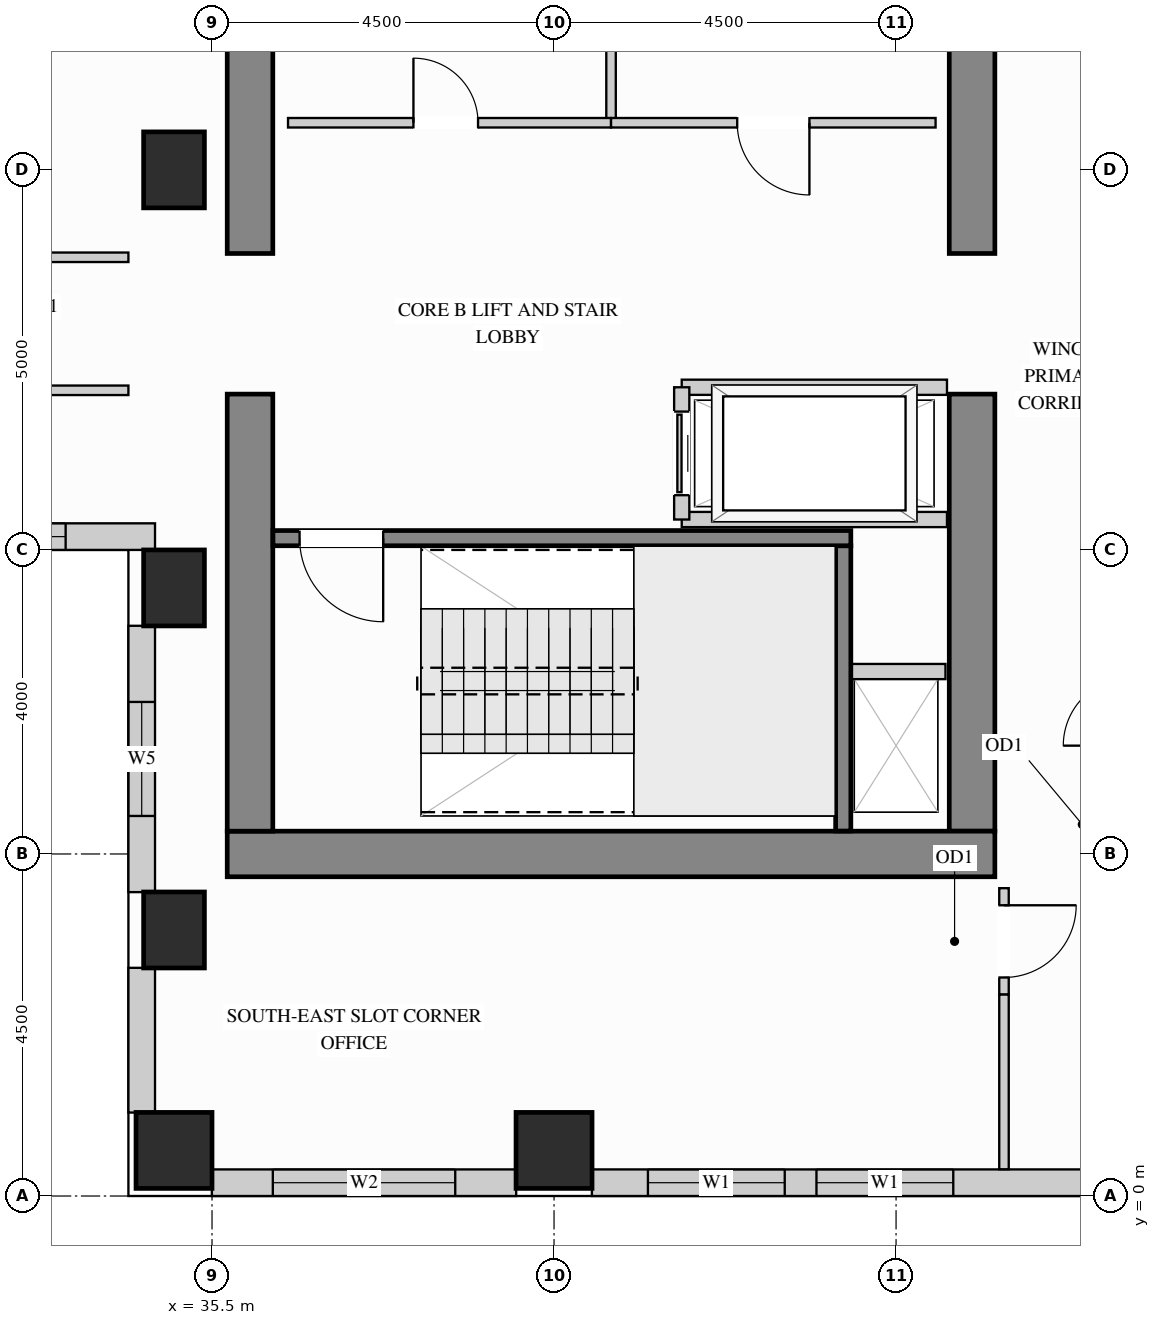
"""IFC4 building model, lengths in metres.
Left out: names, types, materials, properties, quantities, classifications, styles, units other than length and angle.
Written with IfcOpenShell. Run it as: python <this file> out.ifc"""

import sys

from ifc_helpers import new_model, si_unit, direction, frame, frame_2d, origin, origin_2d, place, context, subcontext, project, spatial, rectangle, extrude, source, transform, mapped, element, fill, save


model = new_model("IFC4")
c1 = context("Model", 3, precision=1e-05, world=origin(), true_north=direction((0.0, 1.0)))
c2 = subcontext(c1, "Body", "Model", "MODEL_VIEW")
j1 = project(units=[si_unit("LENGTHUNIT", "METRE"), si_unit("PLANEANGLEUNIT", "RADIAN")], contexts=[c1])
p1 = place(None, origin())
s1 = spatial("IfcSite", under=j1, at=p1, CompositionType="ELEMENT")
p2 = place(p1, origin())
s2 = spatial("IfcBuilding", under=s1, at=p2, CompositionType="ELEMENT")
p3 = place(p2, frame((0.0, 0.0, 171.9)))
s3 = spatial("IfcBuildingStorey", under=s2, at=p3, CompositionType="ELEMENT", Elevation=171.9)
m1 = source(origin(), c2, "Body", "SweptSolid", [
    extrude(rectangle(XDim=0.8, YDim=1.0, at=origin_2d()), origin(), (0.0, 0.0, 1.0), 3.4),
])
for number, where, z_axis, x_axis in (
    (1, (35.0, 13.5, 0.0), (0.0, 0.0, 1.0), (1.0, 0.0, 0.0)),
    (2, (35.0, 3.5, 0.0), (0.0, 0.0, 1.0), (1.0, 0.0, 0.0)),
    (3, (35.0, 8.0, 0.0), (0.0, 0.0, 1.0), (1.0, 0.0, 0.0)),
):
    element("IfcColumn", number, at=place(p3, frame(where, z_axis=z_axis, x_axis=x_axis)), inside=s3, PredefinedType="COLUMN", context=c2, shape_type="MappedRepresentation", body=[
        mapped(m1, transform((0.0, 0.0, 0.0), x_axis=(1.0, 0.0, 0.0), y_axis=(0.0, 1.0, 0.0), z_axis=(0.0, 0.0, 1.0))),
    ])
m2 = source(origin(), c2, "Body", "SweptSolid", [
    extrude(rectangle(XDim=1.0, YDim=1.0, at=origin_2d()), origin(), (0.0, 0.0, 1.0), 3.4),
])
for number, where, z_axis, x_axis in (
    (4, (35.0, 0.6, 0.0), (0.0, 0.0, 1.0), (1.0, 0.0, 0.0)),
    (5, (40.0, 0.6, 0.0), (0.0, 0.0, 1.0), (1.0, 0.0, 0.0)),
):
    element("IfcColumn", number, at=place(p3, frame(where, z_axis=z_axis, x_axis=x_axis)), inside=s3, PredefinedType="COLUMN", context=c2, shape_type="MappedRepresentation", body=[
        mapped(m2, transform((0.0, 0.0, 0.0), x_axis=(1.0, 0.0, 0.0), y_axis=(0.0, 1.0, 0.0), z_axis=(0.0, 0.0, 1.0))),
    ])
m3 = source(origin(), c2, "Body", "SweptSolid", [
    extrude(rectangle(XDim=5.75, YDim=0.6, at=frame_2d((2.875, 0.0))), origin(), (0.0, 0.0, 1.0), 3.4),
])
p4 = place(p3, frame((45.5, 4.8, 0.0), z_axis=(0.0, 0.0, 1.0), x_axis=(0.0, 1.0, 0.0)))
e6 = element("IfcWall", 6, at=p4, inside=s3, PredefinedType="SHEAR", context=c2, shape_type="MappedRepresentation", body=[
    mapped(m3, transform((0.0, 0.0, 0.0), x_axis=(1.0, 0.0, 0.0), y_axis=(0.0, 1.0, 0.0), z_axis=(0.0, 0.0, 1.0))),
])
m4 = source(origin(), c2, "Body", "SweptSolid", [
    extrude(rectangle(XDim=3.8, YDim=0.6, at=frame_2d((1.9, 0.0))), origin(), (0.0, 0.0, 1.0), 3.4),
])
p5 = place(p3, frame((45.5, 12.4, 0.0), z_axis=(0.0, 0.0, 1.0), x_axis=(0.0, 1.0, 0.0)))
e7 = element("IfcWall", 7, at=p5, inside=s3, PredefinedType="SHEAR", context=c2, shape_type="MappedRepresentation", body=[
    mapped(m4, transform((0.0, 0.0, 0.0), x_axis=(1.0, 0.0, 0.0), y_axis=(0.0, 1.0, 0.0), z_axis=(0.0, 0.0, 1.0))),
])
m5 = source(origin(), c2, "Body", "SweptSolid", [
    extrude(rectangle(XDim=10.1, YDim=0.6, at=frame_2d((5.05, 0.0))), origin(), (0.0, 0.0, 1.0), 3.4),
])
p6 = place(p3, frame((35.7, 4.5, 0.0), z_axis=(0.0, 0.0, 1.0), x_axis=(1.0, 0.0, 0.0)))
e8 = element("IfcWall", 8, at=p6, inside=s3, PredefinedType="SHEAR", context=c2, shape_type="MappedRepresentation", body=[
    mapped(m5, transform((0.0, 0.0, 0.0), x_axis=(1.0, 0.0, 0.0), y_axis=(0.0, 1.0, 0.0), z_axis=(0.0, 0.0, 1.0))),
])
p7 = place(p3, frame((36.0, 4.8, 0.0), z_axis=(0.0, 0.0, 1.0), x_axis=(0.0, 1.0, 0.0)))
e9 = element("IfcWall", 9, at=p7, inside=s3, PredefinedType="SHEAR", context=c2, shape_type="MappedRepresentation", body=[
    mapped(m3, transform((0.0, 0.0, 0.0), x_axis=(1.0, 0.0, 0.0), y_axis=(0.0, 1.0, 0.0), z_axis=(0.0, 0.0, 1.0))),
])
p8 = place(p3, frame((36.0, 12.4, 0.0), z_axis=(0.0, 0.0, 1.0), x_axis=(0.0, 1.0, 0.0)))
e10 = element("IfcWall", 10, at=p8, inside=s3, PredefinedType="SHEAR", context=c2, shape_type="MappedRepresentation", body=[
    mapped(m4, transform((0.0, 0.0, 0.0), x_axis=(1.0, 0.0, 0.0), y_axis=(0.0, 1.0, 0.0), z_axis=(0.0, 0.0, 1.0))),
])
p9 = place(p3, frame((30.898, 8.675, 0.0), z_axis=(0.0, 0.0, 1.0), x_axis=(1.0, 0.0, 0.0)))
e11 = element("IfcWall", 11, at=p9, inside=s3, PredefinedType="SOLIDWALL", context=c2, shape_type="SweptSolid", body=[
    extrude(rectangle(XDim=3.852, YDim=0.35, at=frame_2d((1.926, 0.0))), origin(), (0.0, 0.0, 1.0), 3.385),
])
p10 = place(p9, frame((1.176, 0.0, 0.78)))
e12 = element("IfcOpeningElement", 12, at=p10, cuts=e11, PredefinedType="OPENING", context=c2, shape_type="SweptSolid", body=[
    extrude(rectangle(XDim=1.5, YDim=2.0, at=frame_2d((0.75, 1.0))), frame((0.0, 0.185, 0.0), z_axis=(0.0, -1.0, 0.0), x_axis=(1.0, 0.0, 0.0)), (0.0, 0.0, 1.0), 0.37),
])
p11 = place(p3, frame((34.575, 7.502, 0.0), z_axis=(0.0, 0.0, 1.0), x_axis=(0.0, -1.0, 0.0)))
e13 = element("IfcWall", 13, at=p11, inside=s3, PredefinedType="SOLIDWALL", context=c2, shape_type="SweptSolid", body=[
    extrude(rectangle(XDim=3.504, YDim=0.35, at=frame_2d((1.752, 0.0))), origin(), (0.0, 0.0, 1.0), 2.612),
])
p12 = place(p11, frame((1.002, 0.0, 0.78)))
e14 = element("IfcOpeningElement", 14, at=p12, cuts=e13, PredefinedType="OPENING", context=c2, shape_type="SweptSolid", body=[
    extrude(rectangle(XDim=1.5, YDim=1.652, at=frame_2d((0.75, 0.826))), frame((0.0, 0.185, 0.0), z_axis=(0.0, -1.0, 0.0), x_axis=(1.0, 0.0, 0.0)), (0.0, 0.0, 1.0), 0.37),
])
m6 = source(origin(), c2, "Body", "SweptSolid", [
    extrude(rectangle(XDim=1.904, YDim=0.35, at=frame_2d((0.952, 0.0))), origin(), (0.0, 0.0, 1.0), 2.612),
])
p13 = place(p3, frame((34.575, 3.002, 0.0), z_axis=(0.0, 0.0, 1.0), x_axis=(0.0, -1.0, 0.0)))
e15 = element("IfcWall", 15, at=p13, inside=s3, PredefinedType="SOLIDWALL", context=c2, shape_type="MappedRepresentation", body=[
    mapped(m6, transform((0.0, 0.0, 0.0), x_axis=(1.0, 0.0, 0.0), y_axis=(0.0, 1.0, 0.0), z_axis=(0.0, 0.0, 1.0))),
])
p14 = place(p3, frame((35.498, 0.175, 0.0), z_axis=(0.0, 0.0, 1.0), x_axis=(1.0, 0.0, 0.0)))
e16 = element("IfcWall", 16, at=p14, inside=s3, PredefinedType="SOLIDWALL", context=c2, shape_type="SweptSolid", body=[
    extrude(rectangle(XDim=4.004, YDim=0.35, at=frame_2d((2.002, 0.0))), origin(), (0.0, 0.0, 1.0), 2.612),
])
p15 = place(p14, frame((0.802, 0.0, 0.78)))
e17 = element("IfcOpeningElement", 17, at=p15, cuts=e16, PredefinedType="OPENING", context=c2, shape_type="SweptSolid", body=[
    extrude(rectangle(XDim=2.4, YDim=1.652, at=frame_2d((1.2, 0.826))), frame((0.0, 0.185, 0.0), z_axis=(0.0, -1.0, 0.0), x_axis=(1.0, 0.0, 0.0)), (0.0, 0.0, 1.0), 0.37),
])
p16 = place(p3, frame((40.498, 0.175, 0.0), z_axis=(0.0, 0.0, 1.0), x_axis=(1.0, 0.0, 0.0)))
e18 = element("IfcWall", 18, at=p16, inside=s3, PredefinedType="SOLIDWALL", context=c2, shape_type="SweptSolid", body=[
    extrude(rectangle(XDim=6.604, YDim=0.35, at=frame_2d((3.302, 0.0))), origin(), (0.0, 0.0, 1.0), 2.612),
])
p17 = place(p16, frame((0.737, 0.0, 0.78)))
e19 = element("IfcOpeningElement", 19, at=p17, cuts=e18, PredefinedType="OPENING", context=c2, shape_type="SweptSolid", body=[
    extrude(rectangle(XDim=1.8, YDim=1.652, at=frame_2d((0.9, 0.826))), frame((0.0, 0.185, 0.0), z_axis=(0.0, -1.0, 0.0), x_axis=(1.0, 0.0, 0.0)), (0.0, 0.0, 1.0), 0.37),
])
p18 = place(p16, frame((2.955, 0.0, 0.78)))
e20 = element("IfcOpeningElement", 20, at=p18, cuts=e18, PredefinedType="OPENING", context=c2, shape_type="SweptSolid", body=[
    extrude(rectangle(XDim=1.8, YDim=1.652, at=frame_2d((0.9, 0.826))), frame((0.0, 0.185, 0.0), z_axis=(0.0, -1.0, 0.0), x_axis=(1.0, 0.0, 0.0)), (0.0, 0.0, 1.0), 0.37),
])
m7 = source(origin(), c2, "Body", "SweptSolid", [
    extrude(rectangle(XDim=1.93, YDim=0.125, at=frame_2d((0.965, 0.0))), origin(), (0.0, 0.0, 1.0), 3.385),
])
p19 = place(p3, frame((40.75, 14.12, 0.0), z_axis=(0.0, 0.0, 1.0), x_axis=(0.0, 1.0, 0.0)))
e21 = element("IfcWall", 21, at=p19, inside=s3, PredefinedType="PARTITIONING", context=c2, shape_type="MappedRepresentation", body=[
    mapped(m7, transform((0.0, 0.0, 0.0), x_axis=(1.0, 0.0, 0.0), y_axis=(0.0, 1.0, 0.0), z_axis=(0.0, 0.0, 1.0))),
])
p20 = place(p3, frame((36.5, 14.12, 0.0), z_axis=(0.0, 0.0, 1.0), x_axis=(1.0, 0.0, 0.0)))
e22 = element("IfcWall", 22, at=p20, inside=s3, PredefinedType="PARTITIONING", context=c2, shape_type="SweptSolid", body=[
    extrude(rectangle(XDim=4.25, YDim=0.125, at=frame_2d((2.125, 0.0))), origin(), (0.0, 0.0, 1.0), 3.385),
])
p21 = place(p20, frame((1.65, 0.0, 0.0)))
e23 = element("IfcOpeningElement", 23, at=p21, cuts=e22, PredefinedType="OPENING", context=c2, shape_type="SweptSolid", body=[
    extrude(rectangle(XDim=0.85, YDim=2.1, at=frame_2d((0.425, 1.05))), frame((0.0, 0.073, 0.0), z_axis=(0.0, -1.0, 0.0), x_axis=(1.0, 0.0, 0.0)), (0.0, 0.0, 1.0), 0.145),
])
p22 = place(p3, frame((40.75, 14.12, 0.0), z_axis=(0.0, 0.0, 1.0), x_axis=(1.0, 0.0, 0.0)))
e24 = element("IfcWall", 24, at=p22, inside=s3, PredefinedType="PARTITIONING", context=c2, shape_type="SweptSolid", body=[
    extrude(rectangle(XDim=4.27, YDim=0.125, at=frame_2d((2.135, 0.0))), origin(), (0.0, 0.0, 1.0), 3.385),
])
p23 = place(p22, frame((1.66, 0.0, 0.0)))
e25 = element("IfcOpeningElement", 25, at=p23, cuts=e24, PredefinedType="OPENING", context=c2, shape_type="SweptSolid", body=[
    extrude(rectangle(XDim=0.95, YDim=2.15, at=frame_2d((0.475, 1.075))), frame((0.0, 0.073, 0.0), z_axis=(0.0, -1.0, 0.0), x_axis=(1.0, 0.0, 0.0)), (0.0, 0.0, 1.0), 0.145),
])
p24 = place(p3, frame((45.92, 2.65, 0.0), z_axis=(0.0, 0.0, 1.0), x_axis=(0.0, 1.0, 0.0)))
e26 = element("IfcWall", 26, at=p24, inside=s3, PredefinedType="PARTITIONING", context=c2, shape_type="SweptSolid", body=[
    extrude(rectangle(XDim=1.4, YDim=0.125, at=frame_2d((0.7, 0.0))), origin(), (0.0, 0.0, 1.0), 3.385),
])
p25 = place(p24, frame((0.225, 0.0, 0.0)))
e27 = element("IfcOpeningElement", 27, at=p25, cuts=e26, PredefinedType="OPENING", context=c2, shape_type="SweptSolid", body=[
    extrude(rectangle(XDim=0.95, YDim=2.15, at=frame_2d((0.475, 1.075))), frame((0.0, 0.073, 0.0), z_axis=(0.0, -1.0, 0.0), x_axis=(1.0, 0.0, 0.0)), (0.0, 0.0, 1.0), 0.145),
])
m8 = source(origin(), c2, "Body", "SweptSolid", [
    extrude(rectangle(XDim=2.298, YDim=0.125, at=frame_2d((1.149, 0.0))), origin(), (0.0, 0.0, 1.0), 3.385),
])
p26 = place(p3, frame((45.92, 0.352, 0.0), z_axis=(0.0, 0.0, 1.0), x_axis=(0.0, 1.0, 0.0)))
e28 = element("IfcWall", 28, at=p26, inside=s3, PredefinedType="PARTITIONING", context=c2, shape_type="MappedRepresentation", body=[
    mapped(m8, transform((0.0, 0.0, 0.0), x_axis=(1.0, 0.0, 0.0), y_axis=(0.0, 1.0, 0.0), z_axis=(0.0, 0.0, 1.0))),
])
p27 = place(p3, frame((29.85, 12.35, 0.0), z_axis=(0.0, 0.0, 1.0), x_axis=(1.0, 0.0, 0.0)))
e29 = element("IfcWall", 29, at=p27, inside=s3, PredefinedType="PARTITIONING", context=c2, shape_type="SweptSolid", body=[
    extrude(rectangle(XDim=4.55, YDim=0.125, at=frame_2d((2.275, 0.0))), origin(), (0.0, 0.0, 1.0), 3.385),
])
p28 = place(p27, frame((1.8, 0.0, 0.0)))
e30 = element("IfcOpeningElement", 30, at=p28, cuts=e29, PredefinedType="OPENING", context=c2, shape_type="SweptSolid", body=[
    extrude(rectangle(XDim=0.95, YDim=2.15, at=frame_2d((0.475, 1.075))), frame((0.0, 0.073, 0.0), z_axis=(0.0, -1.0, 0.0), x_axis=(1.0, 0.0, 0.0)), (0.0, 0.0, 1.0), 0.145),
])
p29 = place(p3, frame((26.95, 10.6, 0.0), z_axis=(0.0, 0.0, 1.0), x_axis=(1.0, 0.0, 0.0)))
e31 = element("IfcWall", 31, at=p29, inside=s3, PredefinedType="PARTITIONING", context=c2, shape_type="SweptSolid", body=[
    extrude(rectangle(XDim=7.45, YDim=0.125, at=frame_2d((3.725, 0.0))), origin(), (0.0, 0.0, 1.0), 3.385),
])
p30 = place(p29, frame((4.478, 0.0, 0.0)))
e32 = element("IfcOpeningElement", 32, at=p30, cuts=e31, PredefinedType="OPENING", context=c2, shape_type="SweptSolid", body=[
    extrude(rectangle(XDim=0.95, YDim=2.15, at=frame_2d((0.475, 1.075))), frame((0.0, 0.073, 0.0), z_axis=(0.0, -1.0, 0.0), x_axis=(1.0, 0.0, 0.0)), (0.0, 0.0, 1.0), 0.145),
])
m9 = source(origin(), c2, "Body", "SweptSolid", [
    extrude(rectangle(XDim=1.3, YDim=0.2, at=frame_2d((0.65, 0.0))), origin(), (0.0, 0.0, 1.0), 3.385),
])
p31 = place(p3, frame((43.85, 6.9, 0.0), z_axis=(0.0, 0.0, 1.0), x_axis=(1.0, 0.0, 0.0)))
e33 = element("IfcWall", 33, at=p31, inside=s3, PredefinedType="PARTITIONING", context=c2, shape_type="MappedRepresentation", body=[
    mapped(m9, transform((0.0, 0.0, 0.0), x_axis=(1.0, 0.0, 0.0), y_axis=(0.0, 1.0, 0.0), z_axis=(0.0, 0.0, 1.0))),
])
m10 = source(origin(), c2, "Body", "SweptSolid", [
    extrude(rectangle(XDim=3.49, YDim=0.2, at=frame_2d((1.745, 0.0))), origin(), (0.0, 0.0, 1.0), 3.385),
])
for number, where, z_axis, x_axis in (
    (34, (41.68, 10.64, 0.0), (0.0, 0.0, 1.0), (1.0, 0.0, 0.0)),
    (35, (41.68, 8.9, 0.0), (0.0, 0.0, 1.0), (1.0, 0.0, 0.0)),
):
    element("IfcWall", number, at=place(p3, frame(where, z_axis=z_axis, x_axis=x_axis)), inside=s3, PredefinedType="PARTITIONING", context=c2, shape_type="MappedRepresentation", body=[
        mapped(m10, transform((0.0, 0.0, 0.0), x_axis=(1.0, 0.0, 0.0), y_axis=(0.0, 1.0, 0.0), z_axis=(0.0, 0.0, 1.0))),
    ])
p32 = place(p3, frame((41.68, 8.9, 0.0), z_axis=(0.0, 0.0, 1.0), x_axis=(0.0, 1.0, 0.0)))
e36 = element("IfcWall", 36, at=p32, inside=s3, PredefinedType="PARTITIONING", context=c2, shape_type="SweptSolid", body=[
    extrude(rectangle(XDim=1.74, YDim=0.2, at=frame_2d((0.87, 0.0))), origin(), (0.0, 0.0, 1.0), 3.385),
])
p33 = place(p32, frame((0.32, 0.0, 0.0)))
e37 = element("IfcOpeningElement", 37, at=p33, cuts=e36, PredefinedType="OPENING", context=c2, shape_type="SweptSolid", body=[
    extrude(rectangle(XDim=1.1, YDim=2.2, at=frame_2d((0.55, 1.1))), frame((0.0, 0.11, 0.0), z_axis=(0.0, -1.0, 0.0), x_axis=(1.0, 0.0, 0.0)), (0.0, 0.0, 1.0), 0.22),
])
m11 = source(origin(), c2, "Body", "SweptSolid", [
    extrude(rectangle(XDim=3.753, YDim=0.2, at=frame_2d((1.876, 0.0))), origin(), (0.0, 0.0, 1.0), 3.4),
])
p34 = place(p3, frame((43.805, 4.802, 0.0), z_axis=(0.0, 0.0, 1.0), x_axis=(0.0, 1.0, 0.0)))
e38 = element("IfcWall", 38, at=p34, inside=s3, PredefinedType="SHEAR", context=c2, shape_type="MappedRepresentation", body=[
    mapped(m11, transform((0.0, 0.0, 0.0), x_axis=(1.0, 0.0, 0.0), y_axis=(0.0, 1.0, 0.0), z_axis=(0.0, 0.0, 1.0))),
])
p35 = place(p3, frame((36.302, 8.655, 0.0), z_axis=(0.0, 0.0, 1.0), x_axis=(1.0, 0.0, 0.0)))
e39 = element("IfcWall", 39, at=p35, inside=s3, PredefinedType="SHEAR", context=c2, shape_type="SweptSolid", body=[
    extrude(rectangle(XDim=7.603, YDim=0.2, at=frame_2d((3.802, 0.0))), origin(), (0.0, 0.0, 1.0), 3.4),
])
p36 = place(p35, frame((0.35, 0.0, 0.0)))
e40 = element("IfcOpeningElement", 40, at=p36, cuts=e39, PredefinedType="OPENING", context=c2, shape_type="SweptSolid", body=[
    extrude(rectangle(XDim=1.1, YDim=2.15, at=frame_2d((0.55, 1.075))), frame((0.0, 0.11, 0.0), z_axis=(0.0, -1.0, 0.0), x_axis=(1.0, 0.0, 0.0)), (0.0, 0.0, 1.0), 0.22),
])
m12 = source(origin(), c2, "Body", "SweptSolid", [
    extrude(rectangle(XDim=1.1, YDim=2.2, at=frame_2d((0.55, 1.1))), frame((0.0, 0.025, 0.0), z_axis=(0.0, -1.0, 0.0), x_axis=(1.0, 0.0, 0.0)), (0.0, 0.0, 1.0), 0.05),
])
p37 = place(p33, origin())
e41 = element("IfcDoor", 41, at=p37, inside=s3, OperationType="SLIDING_TO_LEFT", PredefinedType="DOOR", context=c2, shape_type="MappedRepresentation", body=[
    mapped(m12, transform((0.0, 0.0, 0.0), x_axis=(1.0, 0.0, 0.0), y_axis=(0.0, 1.0, 0.0), z_axis=(0.0, 0.0, 1.0))),
])
fill(e37, e41)
m13 = source(origin(), c2, "Body", "SweptSolid", [
    extrude(rectangle(XDim=0.95, YDim=2.15, at=frame_2d((0.475, 1.075))), frame((0.0, 0.025, 0.0), z_axis=(0.0, -1.0, 0.0), x_axis=(1.0, 0.0, 0.0)), (0.0, 0.0, 1.0), 0.05),
])
p38 = place(p23, origin())
e42 = element("IfcDoor", 42, at=p38, inside=s3, OperationType="SINGLE_SWING_RIGHT", PredefinedType="DOOR", context=c2, shape_type="MappedRepresentation", body=[
    mapped(m13, transform((0.0, 0.0, 0.0), x_axis=(1.0, 0.0, 0.0), y_axis=(0.0, 1.0, 0.0), z_axis=(0.0, 0.0, 1.0))),
])
fill(e25, e42)
p39 = place(p25, origin())
e43 = element("IfcDoor", 43, at=p39, inside=s3, OperationType="SINGLE_SWING_RIGHT", PredefinedType="DOOR", context=c2, shape_type="MappedRepresentation", body=[
    mapped(m13, transform((0.0, 0.0, 0.0), x_axis=(1.0, 0.0, 0.0), y_axis=(0.0, 1.0, 0.0), z_axis=(0.0, 0.0, 1.0))),
])
fill(e27, e43)
m14 = source(origin(), c2, "Body", "SweptSolid", [
    extrude(rectangle(XDim=0.85, YDim=2.1, at=frame_2d((0.425, 1.05))), frame((0.0, 0.025, 0.0), z_axis=(0.0, -1.0, 0.0), x_axis=(1.0, 0.0, 0.0)), (0.0, 0.0, 1.0), 0.05),
])
p40 = place(p21, origin())
e44 = element("IfcDoor", 44, at=p40, inside=s3, OperationType="SINGLE_SWING_LEFT", PredefinedType="DOOR", context=c2, shape_type="MappedRepresentation", body=[
    mapped(m14, transform((0.0, 0.0, 0.0), x_axis=(1.0, 0.0, 0.0), y_axis=(0.0, 1.0, 0.0), z_axis=(0.0, 0.0, 1.0))),
])
fill(e23, e44)
m15 = source(origin(), c2, "Body", "SweptSolid", [
    extrude(rectangle(XDim=1.1, YDim=2.15, at=frame_2d((0.55, 1.075))), frame((0.0, 0.025, 0.0), z_axis=(0.0, -1.0, 0.0), x_axis=(1.0, 0.0, 0.0)), (0.0, 0.0, 1.0), 0.05),
])
p41 = place(p36, origin())
e45 = element("IfcDoor", 45, at=p41, inside=s3, OperationType="SINGLE_SWING_RIGHT", PredefinedType="DOOR", context=c2, shape_type="MappedRepresentation", body=[
    mapped(m15, transform((0.0, 0.0, 0.0), x_axis=(1.0, 0.0, 0.0), y_axis=(0.0, 1.0, 0.0), z_axis=(0.0, 0.0, 1.0))),
])
fill(e40, e45)
m16 = source(origin(), c2, "Body", "SweptSolid", [
    extrude(rectangle(XDim=1.8, YDim=1.652, at=frame_2d((0.9, 0.826))), frame((0.0, 0.03, 0.0), z_axis=(0.0, -1.0, 0.0), x_axis=(1.0, 0.0, 0.0)), (0.0, 0.0, 1.0), 0.06),
])
p42 = place(p17, origin())
e46 = element("IfcWindow", 46, at=p42, inside=s3, PartitioningType="SINGLE_PANEL", PredefinedType="WINDOW", context=c2, shape_type="MappedRepresentation", body=[
    mapped(m16, transform((0.0, 0.0, 0.0), x_axis=(1.0, 0.0, 0.0), y_axis=(0.0, 1.0, 0.0), z_axis=(0.0, 0.0, 1.0))),
])
fill(e19, e46)
p43 = place(p18, origin())
e47 = element("IfcWindow", 47, at=p43, inside=s3, PartitioningType="SINGLE_PANEL", PredefinedType="WINDOW", context=c2, shape_type="MappedRepresentation", body=[
    mapped(m16, transform((0.0, 0.0, 0.0), x_axis=(1.0, 0.0, 0.0), y_axis=(0.0, 1.0, 0.0), z_axis=(0.0, 0.0, 1.0))),
])
fill(e20, e47)
m17 = source(origin(), c2, "Body", "SweptSolid", [
    extrude(rectangle(XDim=2.4, YDim=1.652, at=frame_2d((1.2, 0.826))), frame((0.0, 0.03, 0.0), z_axis=(0.0, -1.0, 0.0), x_axis=(1.0, 0.0, 0.0)), (0.0, 0.0, 1.0), 0.06),
])
p44 = place(p15, origin())
e48 = element("IfcWindow", 48, at=p44, inside=s3, PartitioningType="SINGLE_PANEL", PredefinedType="WINDOW", context=c2, shape_type="MappedRepresentation", body=[
    mapped(m17, transform((0.0, 0.0, 0.0), x_axis=(1.0, 0.0, 0.0), y_axis=(0.0, 1.0, 0.0), z_axis=(0.0, 0.0, 1.0))),
])
fill(e17, e48)
m18 = source(origin(), c2, "Body", "SweptSolid", [
    extrude(rectangle(XDim=1.5, YDim=2.0, at=frame_2d((0.75, 1.0))), frame((0.0, 0.03, 0.0), z_axis=(0.0, -1.0, 0.0), x_axis=(1.0, 0.0, 0.0)), (0.0, 0.0, 1.0), 0.06),
])
p45 = place(p10, origin())
e49 = element("IfcWindow", 49, at=p45, inside=s3, PartitioningType="SINGLE_PANEL", PredefinedType="WINDOW", context=c2, shape_type="MappedRepresentation", body=[
    mapped(m18, transform((0.0, 0.0, 0.0), x_axis=(1.0, 0.0, 0.0), y_axis=(0.0, 1.0, 0.0), z_axis=(0.0, 0.0, 1.0))),
])
fill(e12, e49)
m19 = source(origin(), c2, "Body", "SweptSolid", [
    extrude(rectangle(XDim=1.5, YDim=1.652, at=frame_2d((0.75, 0.826))), frame((0.0, 0.03, 0.0), z_axis=(0.0, -1.0, 0.0), x_axis=(1.0, 0.0, 0.0)), (0.0, 0.0, 1.0), 0.06),
])
p46 = place(p12, origin())
e50 = element("IfcWindow", 50, at=p46, inside=s3, PartitioningType="SINGLE_PANEL", PredefinedType="WINDOW", context=c2, shape_type="MappedRepresentation", body=[
    mapped(m19, transform((0.0, 0.0, 0.0), x_axis=(1.0, 0.0, 0.0), y_axis=(0.0, 1.0, 0.0), z_axis=(0.0, 0.0, 1.0))),
])
fill(e14, e50)
save(model, sys.argv[1])
